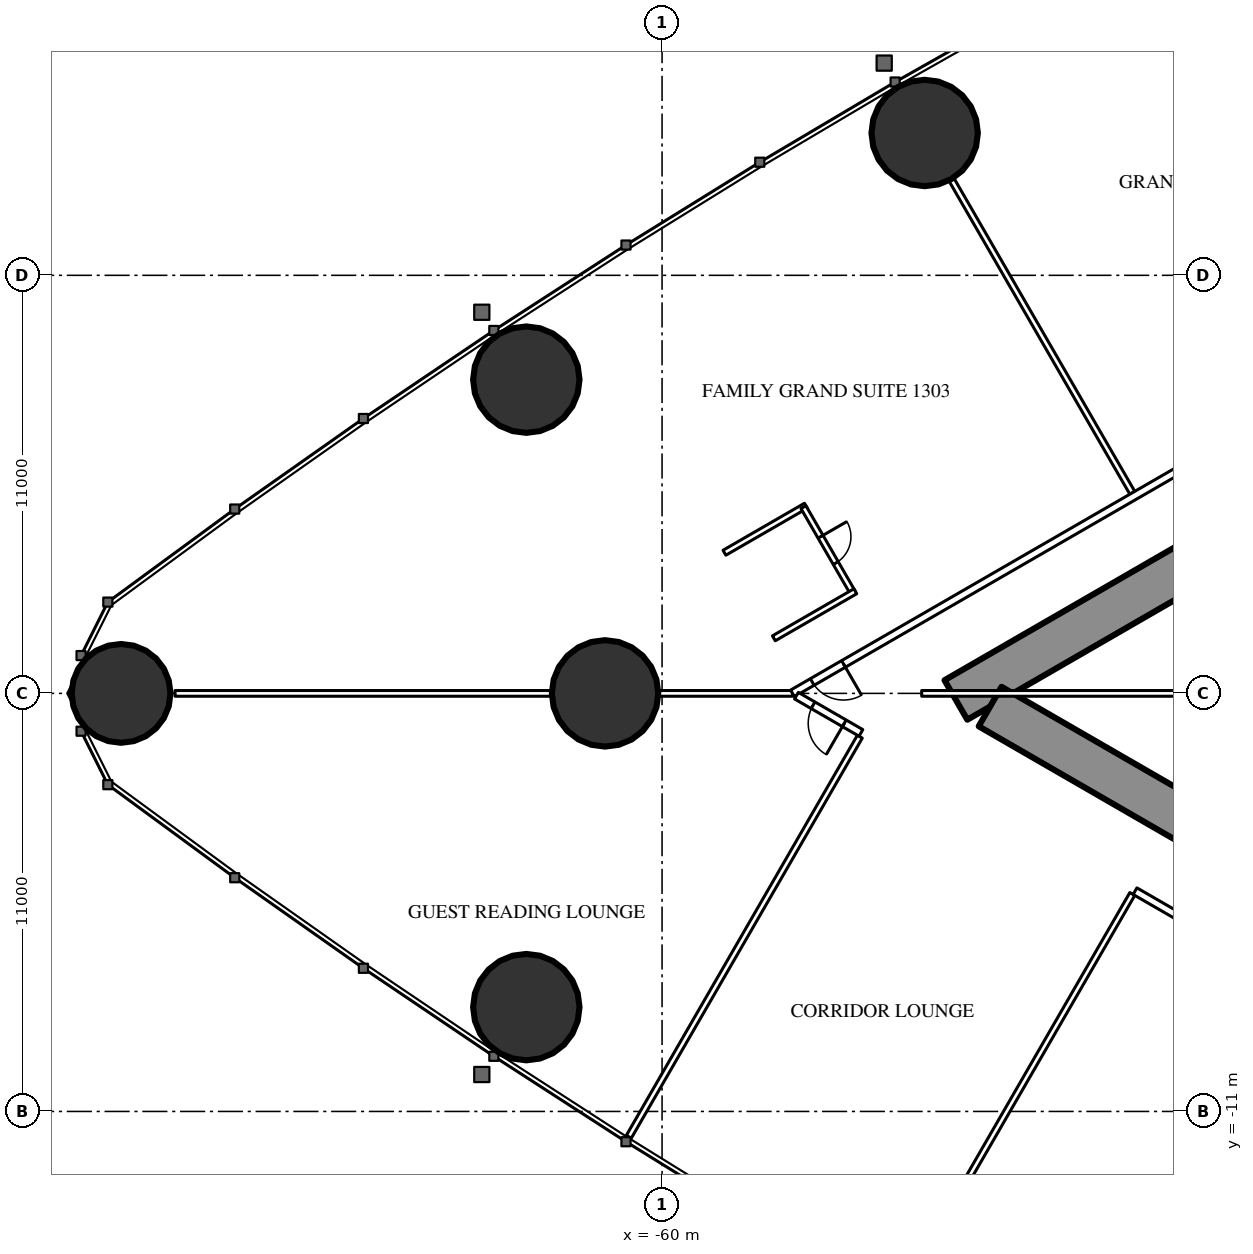
"""IFC4 building model, lengths in metres.
Left out: names, types, materials, properties, quantities, classifications, styles, units other than length and angle.
Written with IfcOpenShell. Run it as: python <this file> out.ifc"""

import sys

from ifc_helpers import new_model, si_unit, direction, frame, frame_2d, origin, origin_2d, place, context, subcontext, project, spatial, rectangle, hollow_circle, extrude, element, fill, save


model = new_model("IFC4")
c1 = context("Model", 3, precision=1e-05, world=origin(), true_north=direction((0.0, 1.0)))
c2 = subcontext(c1, "Body", "Model", "MODEL_VIEW")
j1 = project(units=[si_unit("LENGTHUNIT", "METRE"), si_unit("PLANEANGLEUNIT", "RADIAN")], contexts=[c1])
p1 = place(None, origin())
s1 = spatial("IfcSite", under=j1, at=p1, CompositionType="ELEMENT")
p2 = place(p1, origin())
s2 = spatial("IfcBuilding", under=s1, at=p2, CompositionType="ELEMENT")
p3 = place(p2, frame((0.0, 0.0, 53.0)))
s3 = spatial("IfcBuildingStorey", under=s2, at=p3, CompositionType="ELEMENT", Elevation=53.0)
p4 = place(p3, frame((-74.235, 0.0, 0.0), z_axis=(0.0, 0.0, 1.0), x_axis=(1.0, 0.0, 0.0)))
e1 = element("IfcColumn", 1, at=p4, inside=s3, PredefinedType="COLUMN", context=c2, shape_type="SweptSolid", body=[
    extrude(hollow_circle(Radius=1.3, WallThickness=0.1, at=origin_2d()), origin(), (0.0, 0.0, 1.0), 3.5),
])
for number, where, z_axis, x_axis in (
    (2, (-63.572, -8.255, 0.0), (0.0, 0.0, 1.0), (1.0, 0.0, 0.0)),
    (3, (-53.09, 14.745, 0.0), (0.0, 0.0, 1.0), (1.0, 0.0, 0.0)),
    (4, (-63.572, 8.255, 0.0), (0.0, 0.0, 1.0), (1.0, 0.0, 0.0)),
):
    element("IfcColumn", number, at=place(p3, frame(where, z_axis=z_axis, x_axis=x_axis)), inside=s3, PredefinedType="COLUMN", context=c2, shape_type="SweptSolid", body=[
        extrude(hollow_circle(Radius=1.4, WallThickness=0.12, at=origin_2d()), origin(), (0.0, 0.0, 1.0), 3.5),
    ])
p5 = place(p3, frame((-61.5, 0.0, 0.0), z_axis=(0.0, 0.0, 1.0), x_axis=(1.0, 0.0, 0.0)))
e5 = element("IfcColumn", 5, at=p5, inside=s3, PredefinedType="COLUMN", context=c2, shape_type="SweptSolid", body=[
    extrude(hollow_circle(Radius=1.4, WallThickness=0.1, at=origin_2d()), origin(), (0.0, 0.0, 1.0), 3.5),
])
p6 = place(p3, frame((-27.2, 14.3, 0.0), z_axis=(0.0, 0.0, 1.0), x_axis=(-0.866026593062, -0.499997940104, 0.0)))
e6 = element("IfcWall", 6, at=p6, inside=s3, PredefinedType="SHEAR", context=c2, shape_type="SweptSolid", body=[
    extrude(rectangle(XDim=28.946, YDim=1.2, at=frame_2d((14.473, 0.0))), origin(), (0.0, 0.0, 1.0), 3.5),
])
p7 = place(p6, frame((4.6, 0.0, 0.0)))
e7 = element("IfcOpeningElement", 7, at=p7, cuts=e6, PredefinedType="OPENING", context=c2, shape_type="SweptSolid", body=[
    extrude(rectangle(XDim=1.0, YDim=2.2, at=frame_2d((0.5, 1.1))), frame((0.0, 0.61, 0.0), z_axis=(0.0, -1.0, 0.0), x_axis=(1.0, 0.0, 0.0)), (0.0, 0.0, 1.0), 1.22),
])
p8 = place(p6, frame((13.395, 0.0, 0.0)))
e8 = element("IfcOpeningElement", 8, at=p8, cuts=e6, PredefinedType="OPENING", context=c2, shape_type="SweptSolid", body=[
    extrude(rectangle(XDim=1.8, YDim=2.2, at=frame_2d((0.9, 1.1))), frame((0.0, 0.61, 0.0), z_axis=(0.0, -1.0, 0.0), x_axis=(1.0, 0.0, 0.0)), (0.0, 0.0, 1.0), 1.22),
])
p9 = place(p3, frame((-27.2, -14.3, 0.0), z_axis=(0.0, 0.0, 1.0), x_axis=(-0.866024021859, 0.500002393557, 0.0)))
e9 = element("IfcWall", 9, at=p9, inside=s3, PredefinedType="SHEAR", context=c2, shape_type="SweptSolid", body=[
    extrude(rectangle(XDim=27.907, YDim=1.2, at=frame_2d((13.954, 0.0))), origin(), (0.0, 0.0, 1.0), 3.5),
])
p10 = place(p9, frame((4.6, 0.0, 0.0)))
e10 = element("IfcOpeningElement", 10, at=p10, cuts=e9, PredefinedType="OPENING", context=c2, shape_type="SweptSolid", body=[
    extrude(rectangle(XDim=1.0, YDim=2.2, at=frame_2d((0.5, 1.1))), frame((0.0, 0.61, 0.0), z_axis=(0.0, -1.0, 0.0), x_axis=(1.0, 0.0, 0.0)), (0.0, 0.0, 1.0), 1.22),
])
p11 = place(p9, frame((13.395, 0.0, 0.0)))
e11 = element("IfcOpeningElement", 11, at=p11, cuts=e9, PredefinedType="OPENING", context=c2, shape_type="SweptSolid", body=[
    extrude(rectangle(XDim=1.8, YDim=2.2, at=frame_2d((0.9, 1.1))), frame((0.0, 0.61, 0.0), z_axis=(0.0, -1.0, 0.0), x_axis=(1.0, 0.0, 0.0)), (0.0, 0.0, 1.0), 1.22),
])
for number, where, z_axis, x_axis in (
    (12, (-47.627, 5.278, 0.0), (0.0, 0.0, 1.0), (-0.5, 0.866, 0.0)),
    (13, (-47.627, -5.278, 0.0), (0.0, 0.0, 1.0), (-0.5, -0.866, 0.0)),
):
    element("IfcWall", number, at=place(p3, frame(where, z_axis=z_axis, x_axis=x_axis)), inside=s3, PredefinedType="PARTITIONING", context=c2, shape_type="SweptSolid", body=[
        extrude(rectangle(XDim=9.51, YDim=0.15, at=frame_2d((4.755, 0.0))), origin(), (0.0, 0.0, 1.0), 2.25),
    ])
p12 = place(p3, frame((-54.796, -1.139, 0.0), z_axis=(0.0, 0.0, 1.0), x_axis=(-0.499998860433, -0.866026061713, 0.0)))
e14 = element("IfcWall", 14, at=p12, inside=s3, PredefinedType="PARTITIONING", context=c2, shape_type="SweptSolid", body=[
    extrude(rectangle(XDim=12.157, YDim=0.15, at=frame_2d((6.078, 0.0))), origin(), (0.0, 0.0, 1.0), 3.25),
])
p13 = place(p3, frame((-56.568, 0.0, 0.0), z_axis=(0.0, 0.0, 1.0), x_axis=(-1.0, 0.0, 0.0)))
e15 = element("IfcWall", 15, at=p13, inside=s3, PredefinedType="PARTITIONING", context=c2, shape_type="SweptSolid", body=[
    extrude(rectangle(XDim=16.247, YDim=0.15, at=frame_2d((8.124, 0.0))), origin(), (0.0, 0.0, 1.0), 2.25),
])
p14 = place(p3, frame((-37.7, 10.894, 0.0), z_axis=(0.0, 0.0, 1.0), x_axis=(-0.866027905338, -0.499995667157, 0.0)))
e16 = element("IfcWall", 16, at=p14, inside=s3, PredefinedType="PARTITIONING", context=c2, shape_type="SweptSolid", body=[
    extrude(rectangle(XDim=21.787, YDim=0.2, at=frame_2d((10.894, 0.0))), origin(), (0.0, 0.0, 1.0), 3.25),
])
p15 = place(p14, frame((20.237, 0.0, 0.0)))
e17 = element("IfcOpeningElement", 17, at=p15, cuts=e16, PredefinedType="OPENING", context=c2, shape_type="SweptSolid", body=[
    extrude(rectangle(XDim=0.95, YDim=2.2, at=frame_2d((0.475, 1.1))), frame((0.0, 0.11, 0.0), z_axis=(0.0, -1.0, 0.0), x_axis=(1.0, 0.0, 0.0)), (0.0, 0.0, 1.0), 0.22),
])
p16 = place(p14, frame((2.95, 0.0, 0.0)))
e18 = element("IfcOpeningElement", 18, at=p16, cuts=e16, PredefinedType="OPENING", context=c2, shape_type="SweptSolid", body=[
    extrude(rectangle(XDim=0.95, YDim=2.2, at=frame_2d((0.475, 1.1))), frame((0.0, 0.11, 0.0), z_axis=(0.0, -1.0, 0.0), x_axis=(1.0, 0.0, 0.0)), (0.0, 0.0, 1.0), 0.22),
])
p17 = place(p3, frame((-36.92, -11.344, 0.0), z_axis=(0.0, 0.0, 1.0), x_axis=(-0.866025017052, 0.500000669839, 0.0)))
e19 = element("IfcWall", 19, at=p17, inside=s3, PredefinedType="PARTITIONING", context=c2, shape_type="SweptSolid", body=[
    extrude(rectangle(XDim=12.28, YDim=0.2, at=frame_2d((6.14, 0.0))), origin(), (0.0, 0.0, 1.0), 3.25),
])
p18 = place(p17, frame((3.35, 0.0, 0.0)))
e20 = element("IfcOpeningElement", 20, at=p18, cuts=e19, PredefinedType="OPENING", context=c2, shape_type="SweptSolid", body=[
    extrude(rectangle(XDim=1.0, YDim=2.2, at=frame_2d((0.5, 1.1))), frame((0.0, 0.11, 0.0), z_axis=(0.0, -1.0, 0.0), x_axis=(1.0, 0.0, 0.0)), (0.0, 0.0, 1.0), 0.22),
])
p19 = place(p3, frame((-54.768, -1.04, 0.0), z_axis=(0.0, 0.0, 1.0), x_axis=(-0.866056934013, 0.499945384066, 0.0)))
e21 = element("IfcWall", 21, at=p19, inside=s3, PredefinedType="PARTITIONING", context=c2, shape_type="SweptSolid", body=[
    extrude(rectangle(XDim=1.959, YDim=0.2, at=frame_2d((0.979, 0.0))), origin(), (0.0, 0.0, 1.0), 3.25),
])
p20 = place(p19, frame((0.505, 0.0, 0.0)))
e22 = element("IfcOpeningElement", 22, at=p20, cuts=e21, PredefinedType="OPENING", context=c2, shape_type="SweptSolid", body=[
    extrude(rectangle(XDim=0.95, YDim=2.2, at=frame_2d((0.475, 1.1))), frame((0.0, 0.11, 0.0), z_axis=(0.0, -1.0, 0.0), x_axis=(1.0, 0.0, 0.0)), (0.0, 0.0, 1.0), 0.22),
])
p21 = place(p3, frame((-56.215, 4.938, 0.0), z_axis=(0.0, 0.0, 1.0), x_axis=(-0.866006523861, -0.500032699561, 0.0)))
e23 = element("IfcWall", 23, at=p21, inside=s3, PredefinedType="PARTITIONING", context=c2, shape_type="SweptSolid", body=[
    extrude(rectangle(XDim=2.475, YDim=0.15, at=frame_2d((1.237, 0.0))), origin(), (0.0, 0.0, 1.0), 3.25),
])
p22 = place(p3, frame((-54.98, 2.649, 0.0), z_axis=(0.0, 0.0, 1.0), x_axis=(-0.500006934395, 0.866021400173, 0.0)))
e24 = element("IfcWall", 24, at=p22, inside=s3, PredefinedType="PARTITIONING", context=c2, shape_type="SweptSolid", body=[
    extrude(rectangle(XDim=2.6, YDim=0.15, at=frame_2d((1.3, 0.0))), origin(), (0.0, 0.0, 1.0), 3.25),
])
p23 = place(p22, frame((0.9, 0.0, 0.0)))
e25 = element("IfcOpeningElement", 25, at=p23, cuts=e24, PredefinedType="OPENING", context=c2, shape_type="SweptSolid", body=[
    extrude(rectangle(XDim=0.8, YDim=2.2, at=frame_2d((0.4, 1.1))), frame((0.0, 0.085, 0.0), z_axis=(0.0, -1.0, 0.0), x_axis=(1.0, 0.0, 0.0)), (0.0, 0.0, 1.0), 0.17),
])
p24 = place(p3, frame((-54.915, 2.687, 0.0), z_axis=(0.0, 0.0, 1.0), x_axis=(-0.866006523861, -0.500032699561, 0.0)))
e26 = element("IfcWall", 26, at=p24, inside=s3, PredefinedType="PARTITIONING", context=c2, shape_type="SweptSolid", body=[
    extrude(rectangle(XDim=2.475, YDim=0.15, at=frame_2d((1.237, 0.0))), origin(), (0.0, 0.0, 1.0), 3.25),
])
p25 = place(p3, frame((-44.575, 0.0, 0.0), z_axis=(0.0, 0.0, 1.0), x_axis=(-1.0, 0.0, 0.0)))
e27 = element("IfcWall", 27, at=p25, inside=s3, PredefinedType="PARTITIONING", context=c2, shape_type="SweptSolid", body=[
    extrude(rectangle(XDim=8.593, YDim=0.15, at=frame_2d((4.297, 0.0))), origin(), (0.0, 0.0, 1.0), 2.25),
])
p26 = place(p23, origin())
e28 = element("IfcDoor", 28, at=p26, inside=s3, OperationType="SINGLE_SWING_RIGHT", PredefinedType="DOOR", context=c2, shape_type="SweptSolid", body=[
    extrude(rectangle(XDim=0.8, YDim=2.2, at=frame_2d((0.4, 1.1))), frame((0.0, 0.025, 0.0), z_axis=(0.0, -1.0, 0.0), x_axis=(1.0, 0.0, 0.0)), (0.0, 0.0, 1.0), 0.05),
])
fill(e25, e28)
p27 = place(p15, origin())
e29 = element("IfcDoor", 29, at=p27, inside=s3, OperationType="SINGLE_SWING_LEFT", PredefinedType="DOOR", context=c2, shape_type="SweptSolid", body=[
    extrude(rectangle(XDim=0.95, YDim=2.2, at=frame_2d((0.475, 1.1))), frame((0.0, 0.025, 0.0), z_axis=(0.0, -1.0, 0.0), x_axis=(1.0, 0.0, 0.0)), (0.0, 0.0, 1.0), 0.05),
])
fill(e17, e29)
p28 = place(p20, origin())
e30 = element("IfcDoor", 30, at=p28, inside=s3, OperationType="SINGLE_SWING_LEFT", PredefinedType="DOOR", context=c2, shape_type="SweptSolid", body=[
    extrude(rectangle(XDim=0.95, YDim=2.2, at=frame_2d((0.475, 1.1))), frame((0.0, 0.025, 0.0), z_axis=(0.0, -1.0, 0.0), x_axis=(1.0, 0.0, 0.0)), (0.0, 0.0, 1.0), 0.05),
])
fill(e22, e30)
save(model, sys.argv[1])
